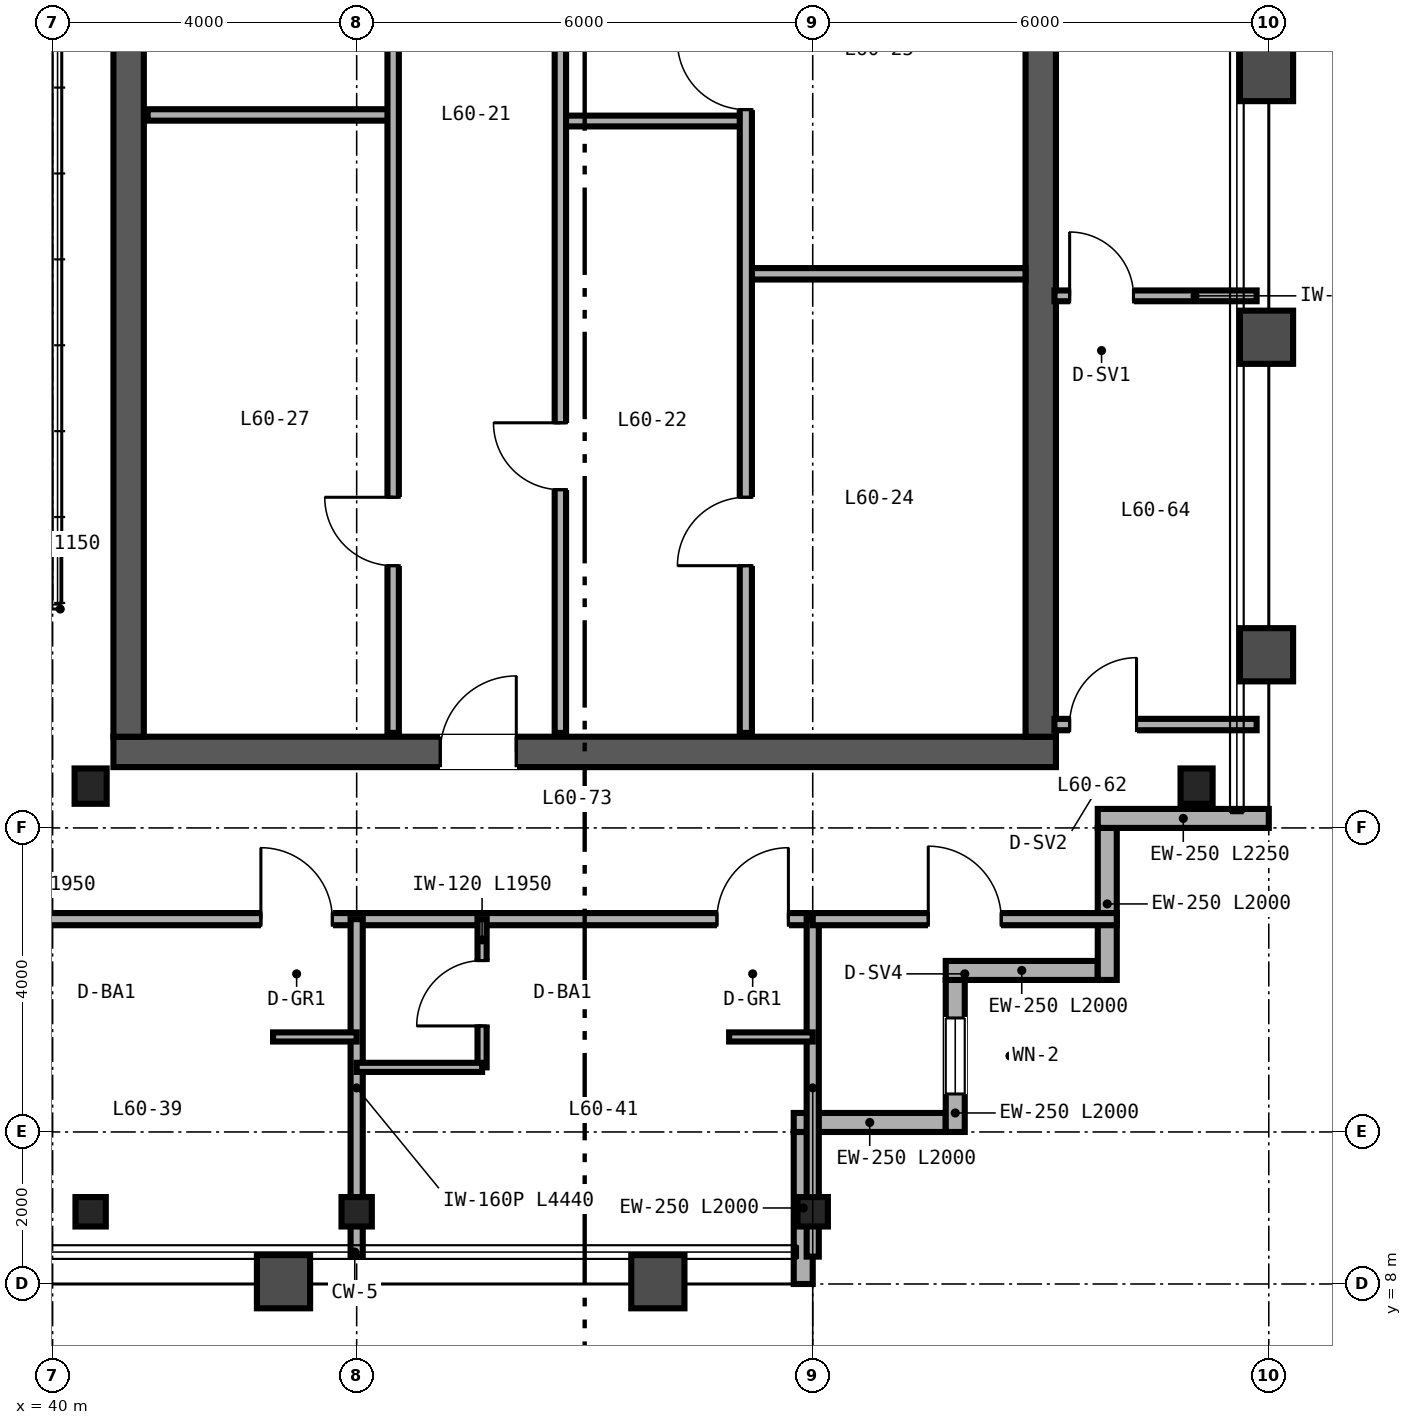
"""IFC4 building model, lengths in metres.
Left out: names, types, materials, properties, quantities, classifications, styles, units other than length and angle.
Written with IfcOpenShell. Run it as: python <this file> out.ifc"""

import sys

from ifc_helpers import new_model, si_unit, direction, frame, frame_2d, origin, origin_2d, place, context, subcontext, project, spatial, rectangle, i_section, extrude, source, transform, mapped, element, fill, save


model = new_model("IFC4")
c1 = context("Model", 3, precision=1e-05, world=origin(), true_north=direction((0.0, 1.0)))
c2 = subcontext(c1, "Body", "Model", "MODEL_VIEW")
j1 = project(units=[si_unit("LENGTHUNIT", "METRE"), si_unit("PLANEANGLEUNIT", "RADIAN")], contexts=[c1])
p1 = place(None, origin())
s1 = spatial("IfcSite", under=j1, at=p1, CompositionType="ELEMENT")
p2 = place(p1, origin())
s2 = spatial("IfcBuilding", under=s1, at=p2, CompositionType="ELEMENT")
p3 = place(p2, frame((0.0, 0.0, 240.0)))
s3 = spatial("IfcBuildingStorey", under=s2, at=p3, CompositionType="ELEMENT", Elevation=240.0)
p4 = place(p3, frame((40.8, 15.0, 0.0), z_axis=(0.0, 0.0, 1.0), x_axis=(1.0, 0.0, 0.0)))
e1 = element("IfcWall", 1, at=p4, inside=s3, PredefinedType="SHEAR", context=c2, shape_type="SweptSolid", body=[
    extrude(rectangle(XDim=12.4, YDim=0.4, at=frame_2d((6.2, 0.0))), origin(), (0.0, 0.0, 1.0), 3.38),
])
p5 = place(p4, frame((4.3, 0.0, 0.0)))
e2 = element("IfcOpeningElement", 2, at=p5, cuts=e1, PredefinedType="OPENING", context=c2, shape_type="SweptSolid", body=[
    extrude(rectangle(XDim=1.0, YDim=2.15, at=frame_2d((0.5, 1.075))), frame((0.0, 0.21, 0.0), z_axis=(0.0, -1.0, 0.0), x_axis=(1.0, 0.0, 0.0)), (0.0, 0.0, 1.0), 0.42),
])
for number, where, z_axis, x_axis in (
    (3, (41.0, 15.2, 0.0), (0.0, 0.0, 1.0), (0.0, 1.0, 0.0)),
    (4, (53.0, 15.2, 0.0), (0.0, 0.0, 1.0), (0.0, 1.0, 0.0)),
):
    element("IfcWall", number, at=place(p3, frame(where, z_axis=z_axis, x_axis=x_axis)), inside=s3, PredefinedType="SHEAR", context=c2, shape_type="SweptSolid", body=[
        extrude(rectangle(XDim=21.6, YDim=0.4, at=frame_2d((10.8, 0.0))), origin(), (0.0, 0.0, 1.0), 3.38),
    ])
m1 = source(origin(), c2, "Body", "SweptSolid", [
    extrude(i_section(OverallWidth=0.422, OverallDepth=0.465, WebThickness=0.045, FlangeThickness=0.073, FilletRadius=0.025, at=origin_2d()), origin(), (0.0, 0.0, 1.0), 3.38),
])
for number, where, z_axis, x_axis in (
    (5, (40.5, 14.55, 0.0), (0.0, 0.0, 1.0), (1.0, 0.0, 0.0)),
    (6, (55.05, 14.55, 0.0), (0.0, 0.0, 1.0), (1.0, 0.0, 0.0)),
):
    element("IfcColumn", number, at=place(p3, frame(where, z_axis=z_axis, x_axis=x_axis)), inside=s3, PredefinedType="COLUMN", context=c2, shape_type="MappedRepresentation", body=[
        mapped(m1, transform((0.0, 0.0, 0.0), scale=1.0)),
    ])
m2 = source(origin(), c2, "Body", "SweptSolid", [
    extrude(i_section(OverallWidth=0.399, OverallDepth=0.387, WebThickness=0.021, FlangeThickness=0.033, FilletRadius=0.025, at=origin_2d()), origin(), (0.0, 0.0, 1.0), 3.38),
])
for number, where, z_axis, x_axis in (
    (7, (40.5, 8.95, 0.0), (0.0, 0.0, 1.0), (1.0, 0.0, 0.0)),
    (8, (44.0, 8.95, 0.0), (0.0, 0.0, 1.0), (1.0, 0.0, 0.0)),
    (9, (50.0, 8.95, 0.0), (0.0, 0.0, 1.0), (1.0, 0.0, 0.0)),
):
    element("IfcColumn", number, at=place(p3, frame(where, z_axis=z_axis, x_axis=x_axis)), inside=s3, PredefinedType="COLUMN", context=c2, shape_type="MappedRepresentation", body=[
        mapped(m2, transform((0.0, 0.0, 0.0), scale=1.0)),
    ])
p6 = place(p3, frame((49.875, 8.0, 0.0), z_axis=(0.0, 0.0, 1.0), x_axis=(0.0, 1.0, 0.0)))
e10 = element("IfcWall", 10, at=p6, inside=s3, PredefinedType="SOLIDWALL", context=c2, shape_type="SweptSolid", body=[
    extrude(rectangle(XDim=2.0, YDim=0.25, at=frame_2d((1.0, 0.0))), origin(), (0.0, 0.0, 1.0), 2.687),
])
p7 = place(p3, frame((49.75, 10.125, 0.0), z_axis=(0.0, 0.0, 1.0), x_axis=(1.0, 0.0, 0.0)))
e11 = element("IfcWall", 11, at=p7, inside=s3, PredefinedType="SOLIDWALL", context=c2, shape_type="SweptSolid", body=[
    extrude(rectangle(XDim=2.0, YDim=0.25, at=frame_2d((1.0, 0.0))), origin(), (0.0, 0.0, 1.0), 3.38),
])
p8 = place(p3, frame((51.875, 10.0, 0.0), z_axis=(0.0, 0.0, 1.0), x_axis=(0.0, 1.0, 0.0)))
e12 = element("IfcWall", 12, at=p8, inside=s3, PredefinedType="SOLIDWALL", context=c2, shape_type="SweptSolid", body=[
    extrude(rectangle(XDim=2.0, YDim=0.25, at=frame_2d((1.0, 0.0))), origin(), (0.0, 0.0, 1.0), 3.38),
])
p9 = place(p8, frame((0.5, 0.0, 0.85)))
e13 = element("IfcOpeningElement", 13, at=p9, cuts=e12, PredefinedType="OPENING", context=c2, shape_type="SweptSolid", body=[
    extrude(rectangle(XDim=1.0, YDim=1.9, at=frame_2d((0.5, 0.95))), frame((0.0, 0.135, 0.0), z_axis=(0.0, -1.0, 0.0), x_axis=(1.0, 0.0, 0.0)), (0.0, 0.0, 1.0), 0.27),
])
for number, where, z_axis, x_axis in (
    (14, (51.75, 12.125, 0.0), (0.0, 0.0, 1.0), (1.0, 0.0, 0.0)),
    (15, (53.875, 12.0, 0.0), (0.0, 0.0, 1.0), (0.0, 1.0, 0.0)),
):
    element("IfcWall", number, at=place(p3, frame(where, z_axis=z_axis, x_axis=x_axis)), inside=s3, PredefinedType="SOLIDWALL", context=c2, shape_type="SweptSolid", body=[
        extrude(rectangle(XDim=2.0, YDim=0.25, at=frame_2d((1.0, 0.0))), origin(), (0.0, 0.0, 1.0), 3.38),
    ])
p10 = place(p3, frame((53.75, 14.125, 0.0), z_axis=(0.0, 0.0, 1.0), x_axis=(1.0, 0.0, 0.0)))
e16 = element("IfcWall", 16, at=p10, inside=s3, PredefinedType="SOLIDWALL", context=c2, shape_type="SweptSolid", body=[
    extrude(rectangle(XDim=2.25, YDim=0.25, at=frame_2d((1.125, 0.0))), origin(), (0.0, 0.0, 1.0), 3.38),
])
p11 = place(p3, frame((46.68, 23.3, 0.0), z_axis=(0.0, 0.0, 1.0), x_axis=(1.0, 0.0, 0.0)))
e17 = element("IfcWall", 17, at=p11, inside=s3, PredefinedType="PARTITIONING", context=c2, shape_type="SweptSolid", body=[
    extrude(rectangle(XDim=2.44, YDim=0.142, at=frame_2d((1.22, 0.0))), origin(), (0.0, 0.0, 1.0), 3.38),
])
p12 = place(p3, frame((46.68, 15.25, 0.0), z_axis=(0.0, 0.0, 1.0), x_axis=(0.0, 1.0, 0.0)))
e18 = element("IfcWall", 18, at=p12, inside=s3, PredefinedType="PARTITIONING", context=c2, shape_type="SweptSolid", body=[
    extrude(rectangle(XDim=16.13, YDim=0.15, at=frame_2d((8.065, 0.0))), origin(), (0.0, 0.0, 1.0), 2.453),
])
p13 = place(p12, frame((3.2, 0.0, 0.0)))
e19 = element("IfcOpeningElement", 19, at=p13, cuts=e18, PredefinedType="OPENING", context=c2, shape_type="SweptSolid", body=[
    extrude(rectangle(XDim=0.88, YDim=2.15, at=frame_2d((0.44, 1.075))), frame((0.0, 0.085, 0.0), z_axis=(0.0, -1.0, 0.0), x_axis=(1.0, 0.0, 0.0)), (0.0, 0.0, 1.0), 0.17),
])
p14 = place(p12, frame((11.2, 0.0, 0.0)))
e20 = element("IfcOpeningElement", 20, at=p14, cuts=e18, PredefinedType="OPENING", context=c2, shape_type="SweptSolid", body=[
    extrude(rectangle(XDim=0.88, YDim=2.15, at=frame_2d((0.44, 1.075))), frame((0.0, 0.085, 0.0), z_axis=(0.0, -1.0, 0.0), x_axis=(1.0, 0.0, 0.0)), (0.0, 0.0, 1.0), 0.17),
])
p15 = place(p3, frame((49.12, 21.29, 0.0), z_axis=(0.0, 0.0, 1.0), x_axis=(1.0, 0.0, 0.0)))
e21 = element("IfcWall", 21, at=p15, inside=s3, PredefinedType="PARTITIONING", context=c2, shape_type="SweptSolid", body=[
    extrude(rectangle(XDim=3.68, YDim=0.15, at=frame_2d((1.84, 0.0))), origin(), (0.0, 0.0, 1.0), 3.38),
])
p16 = place(p3, frame((49.12, 15.25, 0.0), z_axis=(0.0, 0.0, 1.0), x_axis=(0.0, 1.0, 0.0)))
e22 = element("IfcWall", 22, at=p16, inside=s3, PredefinedType="PARTITIONING", context=c2, shape_type="SweptSolid", body=[
    extrude(rectangle(XDim=16.13, YDim=0.16, at=frame_2d((8.065, 0.0))), origin(), (0.0, 0.0, 1.0), 2.453),
])
p17 = place(p16, frame((2.2, 0.0, 0.0)))
e23 = element("IfcOpeningElement", 23, at=p17, cuts=e22, PredefinedType="OPENING", context=c2, shape_type="SweptSolid", body=[
    extrude(rectangle(XDim=0.9, YDim=2.15, at=frame_2d((0.45, 1.075))), frame((0.0, 0.09, 0.0), z_axis=(0.0, -1.0, 0.0), x_axis=(1.0, 0.0, 0.0)), (0.0, 0.0, 1.0), 0.18),
])
p18 = place(p16, frame((8.2, 0.0, 0.0)))
e24 = element("IfcOpeningElement", 24, at=p18, cuts=e22, PredefinedType="OPENING", context=c2, shape_type="SweptSolid", body=[
    extrude(rectangle(XDim=0.9, YDim=2.15, at=frame_2d((0.45, 1.075))), frame((0.0, 0.09, 0.0), z_axis=(0.0, -1.0, 0.0), x_axis=(1.0, 0.0, 0.0)), (0.0, 0.0, 1.0), 0.18),
])
p19 = place(p16, frame((13.5, 0.0, 0.0)))
e25 = element("IfcOpeningElement", 25, at=p19, cuts=e22, PredefinedType="OPENING", context=c2, shape_type="SweptSolid", body=[
    extrude(rectangle(XDim=0.9, YDim=2.15, at=frame_2d((0.45, 1.075))), frame((0.0, 0.09, 0.0), z_axis=(0.0, -1.0, 0.0), x_axis=(1.0, 0.0, 0.0)), (0.0, 0.0, 1.0), 0.18),
])
p20 = place(p3, frame((41.25, 23.38, 0.0), z_axis=(0.0, 0.0, 1.0), x_axis=(1.0, 0.0, 0.0)))
e26 = element("IfcWall", 26, at=p20, inside=s3, PredefinedType="PARTITIONING", context=c2, shape_type="SweptSolid", body=[
    extrude(rectangle(XDim=3.23, YDim=0.15, at=frame_2d((1.615, 0.0))), origin(), (0.0, 0.0, 1.0), 3.38),
])
p21 = place(p3, frame((44.48, 15.25, 0.0), z_axis=(0.0, 0.0, 1.0), x_axis=(0.0, 1.0, 0.0)))
e27 = element("IfcWall", 27, at=p21, inside=s3, PredefinedType="PARTITIONING", context=c2, shape_type="SweptSolid", body=[
    extrude(rectangle(XDim=16.13, YDim=0.15, at=frame_2d((8.065, 0.0))), origin(), (0.0, 0.0, 1.0), 2.453),
])
p22 = place(p21, frame((2.2, 0.0, 0.0)))
e28 = element("IfcOpeningElement", 28, at=p22, cuts=e27, PredefinedType="OPENING", context=c2, shape_type="SweptSolid", body=[
    extrude(rectangle(XDim=0.9, YDim=2.15, at=frame_2d((0.45, 1.075))), frame((0.0, 0.085, 0.0), z_axis=(0.0, -1.0, 0.0), x_axis=(1.0, 0.0, 0.0)), (0.0, 0.0, 1.0), 0.17),
])
p23 = place(p21, frame((10.13, 0.0, 0.0)))
e29 = element("IfcOpeningElement", 29, at=p23, cuts=e27, PredefinedType="OPENING", context=c2, shape_type="SweptSolid", body=[
    extrude(rectangle(XDim=0.9, YDim=2.15, at=frame_2d((0.45, 1.075))), frame((0.0, 0.085, 0.0), z_axis=(0.0, -1.0, 0.0), x_axis=(1.0, 0.0, 0.0)), (0.0, 0.0, 1.0), 0.17),
])
p24 = place(p3, frame((38.0, 12.8, 0.0), z_axis=(0.0, 0.0, 1.0), x_axis=(1.0, 0.0, 0.0)))
e30 = element("IfcWall", 30, at=p24, inside=s3, PredefinedType="PARTITIONING", context=c2, shape_type="SweptSolid", body=[
    extrude(rectangle(XDim=12.0, YDim=0.16, at=frame_2d((6.0, 0.0))), origin(), (0.0, 0.0, 1.0), 2.923),
])
p25 = place(p24, frame((4.74, 0.0, 0.0)))
e31 = element("IfcOpeningElement", 31, at=p25, cuts=e30, PredefinedType="OPENING", context=c2, shape_type="SweptSolid", body=[
    extrude(rectangle(XDim=0.94, YDim=2.15, at=frame_2d((0.47, 1.075))), frame((0.0, 0.09, 0.0), z_axis=(0.0, -1.0, 0.0), x_axis=(1.0, 0.0, 0.0)), (0.0, 0.0, 1.0), 0.18),
])
p26 = place(p24, frame((10.74, 0.0, 0.0)))
e32 = element("IfcOpeningElement", 32, at=p26, cuts=e30, PredefinedType="OPENING", context=c2, shape_type="SweptSolid", body=[
    extrude(rectangle(XDim=0.94, YDim=2.15, at=frame_2d((0.47, 1.075))), frame((0.0, 0.09, 0.0), z_axis=(0.0, -1.0, 0.0), x_axis=(1.0, 0.0, 0.0)), (0.0, 0.0, 1.0), 0.18),
])
for number, where, z_axis, x_axis in (
    (33, (50.0, 8.36, 0.0), (0.0, 0.0, 1.0), (0.0, 1.0, 0.0)),
    (34, (44.0, 8.36, 0.0), (0.0, 0.0, 1.0), (0.0, 1.0, 0.0)),
):
    element("IfcWall", number, at=place(p3, frame(where, z_axis=z_axis, x_axis=x_axis)), inside=s3, PredefinedType="PARTITIONING", context=c2, shape_type="SweptSolid", body=[
        extrude(rectangle(XDim=4.44, YDim=0.16, at=frame_2d((2.22, 0.0))), origin(), (0.0, 0.0, 1.0), 2.687),
    ])
p27 = place(p3, frame((42.9, 11.25, 0.0), z_axis=(0.0, 0.0, 1.0), x_axis=(1.0, 0.0, 0.0)))
e35 = element("IfcWall", 35, at=p27, inside=s3, PredefinedType="PARTITIONING", context=c2, shape_type="SweptSolid", body=[
    extrude(rectangle(XDim=1.1, YDim=0.12, at=frame_2d((0.55, 0.0))), origin(), (0.0, 0.0, 1.0), 3.38),
])
p28 = place(p3, frame((45.65, 10.85, 0.0), z_axis=(0.0, 0.0, 1.0), x_axis=(0.0, 1.0, 0.0)))
e36 = element("IfcWall", 36, at=p28, inside=s3, PredefinedType="PARTITIONING", context=c2, shape_type="SweptSolid", body=[
    extrude(rectangle(XDim=1.95, YDim=0.12, at=frame_2d((0.975, 0.0))), origin(), (0.0, 0.0, 1.0), 3.38),
])
p29 = place(p28, frame((0.545, 0.0, 0.0)))
e37 = element("IfcOpeningElement", 37, at=p29, cuts=e36, PredefinedType="OPENING", context=c2, shape_type="SweptSolid", body=[
    extrude(rectangle(XDim=0.86, YDim=2.1, at=frame_2d((0.43, 1.05))), frame((0.0, 0.07, 0.0), z_axis=(0.0, -1.0, 0.0), x_axis=(1.0, 0.0, 0.0)), (0.0, 0.0, 1.0), 0.14),
])
p30 = place(p3, frame((44.0, 10.85, 0.0), z_axis=(0.0, 0.0, 1.0), x_axis=(1.0, 0.0, 0.0)))
e38 = element("IfcWall", 38, at=p30, inside=s3, PredefinedType="PARTITIONING", context=c2, shape_type="SweptSolid", body=[
    extrude(rectangle(XDim=1.65, YDim=0.12, at=frame_2d((0.825, 0.0))), origin(), (0.0, 0.0, 1.0), 3.38),
])
p31 = place(p3, frame((48.9, 11.25, 0.0), z_axis=(0.0, 0.0, 1.0), x_axis=(1.0, 0.0, 0.0)))
e39 = element("IfcWall", 39, at=p31, inside=s3, PredefinedType="PARTITIONING", context=c2, shape_type="SweptSolid", body=[
    extrude(rectangle(XDim=1.1, YDim=0.12, at=frame_2d((0.55, 0.0))), origin(), (0.0, 0.0, 1.0), 3.38),
])
p32 = place(p3, frame((53.18, 15.36, 0.0), z_axis=(0.0, 0.0, 1.0), x_axis=(1.0, 0.0, 0.0)))
e40 = element("IfcWall", 40, at=p32, inside=s3, PredefinedType="PARTITIONING", context=c2, shape_type="SweptSolid", body=[
    extrude(rectangle(XDim=2.66, YDim=0.15, at=frame_2d((1.33, 0.0))), origin(), (0.0, 0.0, 1.0), 2.601),
])
p33 = place(p32, frame((0.2, 0.0, 0.0)))
e41 = element("IfcOpeningElement", 41, at=p33, cuts=e40, PredefinedType="OPENING", context=c2, shape_type="SweptSolid", body=[
    extrude(rectangle(XDim=0.88, YDim=2.15, at=frame_2d((0.44, 1.075))), frame((0.0, 0.085, 0.0), z_axis=(0.0, -1.0, 0.0), x_axis=(1.0, 0.0, 0.0)), (0.0, 0.0, 1.0), 0.17),
])
p34 = place(p3, frame((53.18, 21.0, 0.0), z_axis=(0.0, 0.0, 1.0), x_axis=(1.0, 0.0, 0.0)))
e42 = element("IfcWall", 42, at=p34, inside=s3, PredefinedType="PARTITIONING", context=c2, shape_type="SweptSolid", body=[
    extrude(rectangle(XDim=2.66, YDim=0.142, at=frame_2d((1.33, 0.0))), origin(), (0.0, 0.0, 1.0), 2.601),
])
p35 = place(p34, frame((0.2, 0.0, 0.0)))
e43 = element("IfcOpeningElement", 43, at=p35, cuts=e42, PredefinedType="OPENING", context=c2, shape_type="SweptSolid", body=[
    extrude(rectangle(XDim=0.84, YDim=2.1, at=frame_2d((0.42, 1.05))), frame((0.0, 0.081, 0.0), z_axis=(0.0, -1.0, 0.0), x_axis=(1.0, 0.0, 0.0)), (0.0, 0.0, 1.0), 0.162),
])
p36 = place(p3, frame((50.0, 12.8, 0.0), z_axis=(0.0, 0.0, 1.0), x_axis=(1.0, 0.0, 0.0)))
e44 = element("IfcWall", 44, at=p36, inside=s3, PredefinedType="PARTITIONING", context=c2, shape_type="SweptSolid", body=[
    extrude(rectangle(XDim=4.0, YDim=0.16, at=frame_2d((2.0, 0.0))), origin(), (0.0, 0.0, 1.0), 3.38),
])
p37 = place(p36, frame((1.52, 0.0, 0.0)))
e45 = element("IfcOpeningElement", 45, at=p37, cuts=e44, PredefinedType="OPENING", context=c2, shape_type="SweptSolid", body=[
    extrude(rectangle(XDim=0.96, YDim=2.15, at=frame_2d((0.48, 1.075))), frame((0.0, 0.09, 0.0), z_axis=(0.0, -1.0, 0.0), x_axis=(1.0, 0.0, 0.0)), (0.0, 0.0, 1.0), 0.18),
])
m3 = source(origin(), c2, "Body", "SweptSolid", [
    extrude(rectangle(XDim=1.0, YDim=1.9, at=frame_2d((0.5, 0.95))), frame((0.0, 0.03, 0.0), z_axis=(0.0, -1.0, 0.0), x_axis=(1.0, 0.0, 0.0)), (0.0, 0.0, 1.0), 0.06),
])
p38 = place(p9, origin())
e46 = element("IfcWindow", 46, at=p38, inside=s3, PartitioningType="SINGLE_PANEL", PredefinedType="WINDOW", context=c2, shape_type="MappedRepresentation", body=[
    mapped(m3, transform((0.0, 0.0, 0.0), scale=1.0)),
])
fill(e13, e46)
m4 = source(origin(), c2, "Body", "SweptSolid", [
    extrude(rectangle(XDim=0.88, YDim=2.15, at=frame_2d((0.44, 1.075))), frame((0.0, 0.025, 0.0), z_axis=(0.0, -1.0, 0.0), x_axis=(1.0, 0.0, 0.0)), (0.0, 0.0, 1.0), 0.05),
])
p39 = place(p13, origin())
e47 = element("IfcDoor", 47, at=p39, inside=s3, OperationType="SINGLE_SWING_RIGHT", PredefinedType="DOOR", context=c2, shape_type="MappedRepresentation", body=[
    mapped(m4, transform((0.0, 0.0, 0.0), scale=1.0)),
])
fill(e19, e47)
m5 = source(origin(), c2, "Body", "SweptSolid", [
    extrude(rectangle(XDim=1.0, YDim=2.15, at=frame_2d((0.5, 1.075))), frame((0.0, 0.025, 0.0), z_axis=(0.0, -1.0, 0.0), x_axis=(1.0, 0.0, 0.0)), (0.0, 0.0, 1.0), 0.05),
])
p40 = place(p5, origin())
e48 = element("IfcDoor", 48, at=p40, inside=s3, OperationType="SINGLE_SWING_RIGHT", PredefinedType="DOOR", context=c2, shape_type="MappedRepresentation", body=[
    mapped(m5, transform((0.0, 0.0, 0.0), scale=1.0)),
])
fill(e2, e48)
m6 = source(origin(), c2, "Body", "SweptSolid", [
    extrude(rectangle(XDim=0.9, YDim=2.15, at=frame_2d((0.45, 1.075))), frame((0.0, 0.025, 0.0), z_axis=(0.0, -1.0, 0.0), x_axis=(1.0, 0.0, 0.0)), (0.0, 0.0, 1.0), 0.05),
])
p41 = place(p17, origin())
e49 = element("IfcDoor", 49, at=p41, inside=s3, OperationType="SINGLE_SWING_LEFT", PredefinedType="DOOR", context=c2, shape_type="MappedRepresentation", body=[
    mapped(m6, transform((0.0, 0.0, 0.0), scale=1.0)),
])
fill(e23, e49)
p42 = place(p18, origin())
e50 = element("IfcDoor", 50, at=p42, inside=s3, OperationType="SINGLE_SWING_RIGHT", PredefinedType="DOOR", context=c2, shape_type="MappedRepresentation", body=[
    mapped(m6, transform((0.0, 0.0, 0.0), scale=1.0)),
])
fill(e24, e50)
p43 = place(p22, origin())
e51 = element("IfcDoor", 51, at=p43, inside=s3, OperationType="SINGLE_SWING_RIGHT", PredefinedType="DOOR", context=c2, shape_type="MappedRepresentation", body=[
    mapped(m6, transform((0.0, 0.0, 0.0), scale=1.0)),
])
fill(e28, e51)
m7 = source(origin(), c2, "Body", "SweptSolid", [
    extrude(rectangle(XDim=0.86, YDim=2.1, at=frame_2d((0.43, 1.05))), frame((0.0, 0.025, 0.0), z_axis=(0.0, -1.0, 0.0), x_axis=(1.0, 0.0, 0.0)), (0.0, 0.0, 1.0), 0.05),
])
p44 = place(p29, origin())
e52 = element("IfcDoor", 52, at=p44, inside=s3, OperationType="SINGLE_SWING_LEFT", PredefinedType="DOOR", context=c2, shape_type="MappedRepresentation", body=[
    mapped(m7, transform((0.0, 0.0, 0.0), scale=1.0)),
])
fill(e37, e52)
m8 = source(origin(), c2, "Body", "SweptSolid", [
    extrude(rectangle(XDim=0.94, YDim=2.15, at=frame_2d((0.47, 1.075))), frame((0.0, 0.025, 0.0), z_axis=(0.0, -1.0, 0.0), x_axis=(1.0, 0.0, 0.0)), (0.0, 0.0, 1.0), 0.05),
])
p45 = place(p25, origin())
e53 = element("IfcDoor", 53, at=p45, inside=s3, OperationType="SINGLE_SWING_LEFT", PredefinedType="DOOR", context=c2, shape_type="MappedRepresentation", body=[
    mapped(m8, transform((0.0, 0.0, 0.0), scale=1.0)),
])
fill(e31, e53)
p46 = place(p26, origin())
e54 = element("IfcDoor", 54, at=p46, inside=s3, OperationType="SINGLE_SWING_RIGHT", PredefinedType="DOOR", context=c2, shape_type="MappedRepresentation", body=[
    mapped(m8, transform((0.0, 0.0, 0.0), scale=1.0)),
])
fill(e32, e54)
p47 = place(p33, origin())
e55 = element("IfcDoor", 55, at=p47, inside=s3, OperationType="SINGLE_SWING_RIGHT", PredefinedType="DOOR", context=c2, shape_type="MappedRepresentation", body=[
    mapped(m4, transform((0.0, 0.0, 0.0), scale=1.0)),
])
fill(e41, e55)
m9 = source(origin(), c2, "Body", "SweptSolid", [
    extrude(rectangle(XDim=0.84, YDim=2.1, at=frame_2d((0.42, 1.05))), frame((0.0, 0.025, 0.0), z_axis=(0.0, -1.0, 0.0), x_axis=(1.0, 0.0, 0.0)), (0.0, 0.0, 1.0), 0.05),
])
p48 = place(p35, origin())
e56 = element("IfcDoor", 56, at=p48, inside=s3, OperationType="SINGLE_SWING_LEFT", PredefinedType="DOOR", context=c2, shape_type="MappedRepresentation", body=[
    mapped(m9, transform((0.0, 0.0, 0.0), scale=1.0)),
])
fill(e43, e56)
m10 = source(origin(), c2, "Body", "SweptSolid", [
    extrude(rectangle(XDim=0.96, YDim=2.15, at=frame_2d((0.48, 1.075))), frame((0.0, 0.025, 0.0), z_axis=(0.0, -1.0, 0.0), x_axis=(1.0, 0.0, 0.0)), (0.0, 0.0, 1.0), 0.05),
])
p49 = place(p37, origin())
e57 = element("IfcDoor", 57, at=p49, inside=s3, OperationType="SINGLE_SWING_LEFT", PredefinedType="DOOR", context=c2, shape_type="MappedRepresentation", body=[
    mapped(m10, transform((0.0, 0.0, 0.0), scale=1.0)),
])
fill(e45, e57)
save(model, sys.argv[1])
